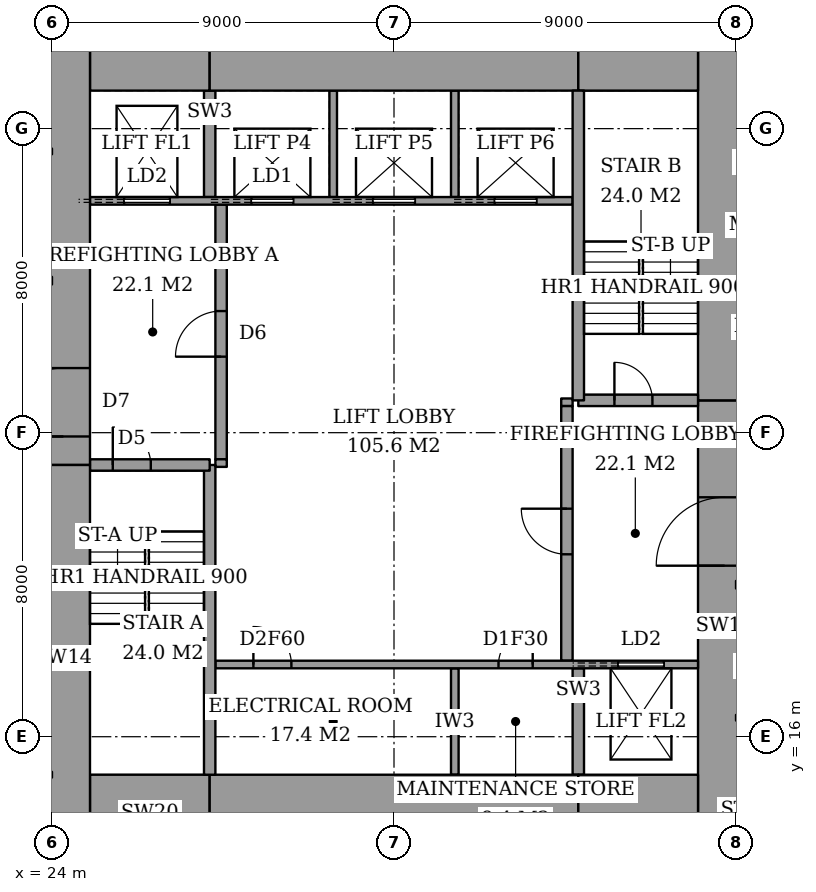
"""IFC4 building model, lengths in metres.
Left out: names, types, materials, properties, quantities, classifications, styles, units other than length and angle.
Written with IfcOpenShell. Run it as: python <this file> out.ifc"""

import sys

from ifc_helpers import new_model, si_unit, direction, frame, frame_2d, origin, place, context, subcontext, project, spatial, rectangle, extrude, element, fill, save


model = new_model("IFC4")
c1 = context("Model", 3, precision=1e-05, world=origin(), true_north=direction((0.0, 1.0)))
c2 = subcontext(c1, "Body", "Model", "MODEL_VIEW")
j1 = project(units=[si_unit("LENGTHUNIT", "METRE"), si_unit("PLANEANGLEUNIT", "RADIAN")], contexts=[c1])
p1 = place(None, origin())
s1 = spatial("IfcSite", under=j1, at=p1, CompositionType="ELEMENT")
p2 = place(p1, origin())
s2 = spatial("IfcBuilding", under=s1, at=p2, CompositionType="ELEMENT")
p3 = place(p2, frame((0.0, 0.0, 196.6)))
s3 = spatial("IfcBuildingStorey", under=s2, at=p3, CompositionType="ELEMENT", Elevation=196.6)
p4 = place(p3, frame((25.0, 14.0, 0.0), z_axis=(0.0, 0.0, 1.0), x_axis=(1.0, 0.0, 0.0)))
e1 = element("IfcWall", 1, at=p4, inside=s3, PredefinedType="SHEAR", context=c2, shape_type="SweptSolid", body=[
    extrude(rectangle(XDim=3.15, YDim=2.0, at=frame_2d((1.575, 0.0))), origin(), (0.0, 0.0, 1.0), 3.6),
])
p5 = place(p3, frame((28.15, 14.0, 0.0), z_axis=(0.0, 0.0, 1.0), x_axis=(1.0, 0.0, 0.0)))
e2 = element("IfcWall", 2, at=p5, inside=s3, PredefinedType="SHEAR", context=c2, shape_type="SweptSolid", body=[
    extrude(rectangle(XDim=9.7, YDim=2.0, at=frame_2d((4.85, 0.0))), origin(), (0.0, 0.0, 1.0), 3.6),
])
for number, where, z_axis, x_axis in (
    (3, (37.85, 14.0, 0.0), (0.0, 0.0, 1.0), (1.0, 0.0, 0.0)),
    (4, (25.0, 34.0, 0.0), (0.0, 0.0, 1.0), (1.0, 0.0, 0.0)),
):
    element("IfcWall", number, at=place(p3, frame(where, z_axis=z_axis, x_axis=x_axis)), inside=s3, PredefinedType="SHEAR", context=c2, shape_type="SweptSolid", body=[
        extrude(rectangle(XDim=3.15, YDim=2.0, at=frame_2d((1.575, 0.0))), origin(), (0.0, 0.0, 1.0), 3.6),
    ])
p6 = place(p3, frame((28.15, 34.0, 0.0), z_axis=(0.0, 0.0, 1.0), x_axis=(1.0, 0.0, 0.0)))
e5 = element("IfcWall", 5, at=p6, inside=s3, PredefinedType="SHEAR", context=c2, shape_type="SweptSolid", body=[
    extrude(rectangle(XDim=9.7, YDim=2.0, at=frame_2d((4.85, 0.0))), origin(), (0.0, 0.0, 1.0), 3.6),
])
p7 = place(p3, frame((37.85, 34.0, 0.0), z_axis=(0.0, 0.0, 1.0), x_axis=(1.0, 0.0, 0.0)))
e6 = element("IfcWall", 6, at=p7, inside=s3, PredefinedType="SHEAR", context=c2, shape_type="SweptSolid", body=[
    extrude(rectangle(XDim=3.15, YDim=2.0, at=frame_2d((1.575, 0.0))), origin(), (0.0, 0.0, 1.0), 3.6),
])
p8 = place(p3, frame((24.3, 13.0, 0.0), z_axis=(0.0, 0.0, 1.0), x_axis=(0.0, 1.0, 0.0)))
e7 = element("IfcWall", 7, at=p8, inside=s3, PredefinedType="SHEAR", context=c2, shape_type="SweptSolid", body=[
    extrude(rectangle(XDim=10.15, YDim=1.4, at=frame_2d((5.075, 0.0))), origin(), (0.0, 0.0, 1.0), 3.6),
])
p9 = place(p3, frame((24.3, 23.15, 0.0), z_axis=(0.0, 0.0, 1.0), x_axis=(0.0, 1.0, 0.0)))
e8 = element("IfcWall", 8, at=p9, inside=s3, PredefinedType="SHEAR", context=c2, shape_type="SweptSolid", body=[
    extrude(rectangle(XDim=11.85, YDim=1.4, at=frame_2d((5.925, 0.0))), origin(), (0.0, 0.0, 1.0), 3.6),
])
p10 = place(p9, frame((0.75, 0.0, 0.0)))
e9 = element("IfcOpeningElement", 9, at=p10, cuts=e8, PredefinedType="OPENING", context=c2, shape_type="SweptSolid", body=[
    extrude(rectangle(XDim=1.8, YDim=2.4, at=frame_2d((0.9, 1.2))), frame((0.0, 0.71, 0.0), z_axis=(0.0, -1.0, 0.0), x_axis=(1.0, 0.0, 0.0)), (0.0, 0.0, 1.0), 1.42),
])
p11 = place(p3, frame((41.7, 13.0, 0.0), z_axis=(0.0, 0.0, 1.0), x_axis=(0.0, 1.0, 0.0)))
e10 = element("IfcWall", 10, at=p11, inside=s3, PredefinedType="SHEAR", context=c2, shape_type="SweptSolid", body=[
    extrude(rectangle(XDim=11.85, YDim=1.4, at=frame_2d((5.925, 0.0))), origin(), (0.0, 0.0, 1.0), 3.6),
])
p12 = place(p11, frame((7.5, 0.0, 0.0)))
e11 = element("IfcOpeningElement", 11, at=p12, cuts=e10, PredefinedType="OPENING", context=c2, shape_type="SweptSolid", body=[
    extrude(rectangle(XDim=1.8, YDim=2.4, at=frame_2d((0.9, 1.2))), frame((0.0, 0.71, 0.0), z_axis=(0.0, -1.0, 0.0), x_axis=(1.0, 0.0, 0.0)), (0.0, 0.0, 1.0), 1.42),
])
p13 = place(p3, frame((41.7, 24.85, 0.0), z_axis=(0.0, 0.0, 1.0), x_axis=(0.0, 1.0, 0.0)))
e12 = element("IfcWall", 12, at=p13, inside=s3, PredefinedType="SHEAR", context=c2, shape_type="SweptSolid", body=[
    extrude(rectangle(XDim=10.15, YDim=1.4, at=frame_2d((5.075, 0.0))), origin(), (0.0, 0.0, 1.0), 3.6),
])
p14 = place(p3, frame((28.15, 15.0, 0.0), z_axis=(0.0, 0.0, 1.0), x_axis=(0.0, 1.0, 0.0)))
e13 = element("IfcWall", 13, at=p14, inside=s3, PredefinedType="SHEAR", context=c2, shape_type="SweptSolid", body=[
    extrude(rectangle(XDim=8.15, YDim=0.3, at=frame_2d((4.075, 0.0))), origin(), (0.0, 0.0, 1.0), 3.6),
])
p15 = place(p3, frame((25.0, 23.15, 0.0), z_axis=(0.0, 0.0, 1.0), x_axis=(1.0, 0.0, 0.0)))
e14 = element("IfcWall", 14, at=p15, inside=s3, PredefinedType="SHEAR", context=c2, shape_type="SweptSolid", body=[
    extrude(rectangle(XDim=3.15, YDim=0.3, at=frame_2d((1.575, 0.0))), origin(), (0.0, 0.0, 1.0), 3.6),
])
p16 = place(p15, frame((0.6, 0.0, 0.0)))
e15 = element("IfcOpeningElement", 15, at=p16, cuts=e14, PredefinedType="OPENING", context=c2, shape_type="SweptSolid", body=[
    extrude(rectangle(XDim=1.0, YDim=2.1, at=frame_2d((0.5, 1.05))), frame((0.0, 0.16, 0.0), z_axis=(0.0, -1.0, 0.0), x_axis=(1.0, 0.0, 0.0)), (0.0, 0.0, 1.0), 0.32),
])
p17 = place(p3, frame((37.85, 24.85, 0.0), z_axis=(0.0, 0.0, 1.0), x_axis=(0.0, 1.0, 0.0)))
e16 = element("IfcWall", 16, at=p17, inside=s3, PredefinedType="SHEAR", context=c2, shape_type="SweptSolid", body=[
    extrude(rectangle(XDim=8.15, YDim=0.3, at=frame_2d((4.075, 0.0))), origin(), (0.0, 0.0, 1.0), 3.6),
])
p18 = place(p3, frame((37.85, 24.85, 0.0), z_axis=(0.0, 0.0, 1.0), x_axis=(1.0, 0.0, 0.0)))
e17 = element("IfcWall", 17, at=p18, inside=s3, PredefinedType="SHEAR", context=c2, shape_type="SweptSolid", body=[
    extrude(rectangle(XDim=3.15, YDim=0.3, at=frame_2d((1.575, 0.0))), origin(), (0.0, 0.0, 1.0), 3.6),
])
p19 = place(p18, frame((0.95, 0.0, 0.0)))
e18 = element("IfcOpeningElement", 18, at=p19, cuts=e17, PredefinedType="OPENING", context=c2, shape_type="SweptSolid", body=[
    extrude(rectangle(XDim=1.0, YDim=2.1, at=frame_2d((0.5, 1.05))), frame((0.0, 0.16, 0.0), z_axis=(0.0, -1.0, 0.0), x_axis=(1.0, 0.0, 0.0)), (0.0, 0.0, 1.0), 0.32),
])
p20 = place(p3, frame((28.45, 23.3, 0.0), z_axis=(0.0, 0.0, 1.0), x_axis=(0.0, 1.0, 0.0)))
e19 = element("IfcWall", 19, at=p20, inside=s3, PredefinedType="PARTITIONING", context=c2, shape_type="SweptSolid", body=[
    extrude(rectangle(XDim=6.7, YDim=0.3, at=frame_2d((3.35, 0.0))), origin(), (0.0, 0.0, 1.0), 3.6),
])
p21 = place(p20, frame((2.7, 0.0, 0.0)))
e20 = element("IfcOpeningElement", 20, at=p21, cuts=e19, PredefinedType="OPENING", context=c2, shape_type="SweptSolid", body=[
    extrude(rectangle(XDim=1.2, YDim=2.1, at=frame_2d((0.6, 1.05))), frame((0.0, 0.16, 0.0), z_axis=(0.0, -1.0, 0.0), x_axis=(1.0, 0.0, 0.0)), (0.0, 0.0, 1.0), 0.32),
])
p22 = place(p3, frame((37.55, 18.0, 0.0), z_axis=(0.0, 0.0, 1.0), x_axis=(0.0, 1.0, 0.0)))
e21 = element("IfcWall", 21, at=p22, inside=s3, PredefinedType="PARTITIONING", context=c2, shape_type="SweptSolid", body=[
    extrude(rectangle(XDim=6.7, YDim=0.3, at=frame_2d((3.35, 0.0))), origin(), (0.0, 0.0, 1.0), 3.6),
])
p23 = place(p22, frame((2.8, 0.0, 0.0)))
e22 = element("IfcOpeningElement", 22, at=p23, cuts=e21, PredefinedType="OPENING", context=c2, shape_type="SweptSolid", body=[
    extrude(rectangle(XDim=1.2, YDim=2.1, at=frame_2d((0.6, 1.05))), frame((0.0, 0.16, 0.0), z_axis=(0.0, -1.0, 0.0), x_axis=(1.0, 0.0, 0.0)), (0.0, 0.0, 1.0), 0.32),
])
p24 = place(p3, frame((28.3, 17.9, 0.0), z_axis=(0.0, 0.0, 1.0), x_axis=(1.0, 0.0, 0.0)))
e23 = element("IfcWall", 23, at=p24, inside=s3, PredefinedType="PARTITIONING", context=c2, shape_type="SweptSolid", body=[
    extrude(rectangle(XDim=12.7, YDim=0.2, at=frame_2d((6.35, 0.0))), origin(), (0.0, 0.0, 1.0), 3.6),
])
p25 = place(p24, frame((1.0, 0.0, 0.0)))
e24 = element("IfcOpeningElement", 24, at=p25, cuts=e23, PredefinedType="OPENING", context=c2, shape_type="SweptSolid", body=[
    extrude(rectangle(XDim=1.0, YDim=2.1, at=frame_2d((0.5, 1.05))), frame((0.0, 0.11, 0.0), z_axis=(0.0, -1.0, 0.0), x_axis=(1.0, 0.0, 0.0)), (0.0, 0.0, 1.0), 0.22),
])
p26 = place(p24, frame((7.45, 0.0, 0.0)))
e25 = element("IfcOpeningElement", 25, at=p26, cuts=e23, PredefinedType="OPENING", context=c2, shape_type="SweptSolid", body=[
    extrude(rectangle(XDim=0.9, YDim=2.1, at=frame_2d((0.45, 1.05))), frame((0.0, 0.11, 0.0), z_axis=(0.0, -1.0, 0.0), x_axis=(1.0, 0.0, 0.0)), (0.0, 0.0, 1.0), 0.22),
])
p27 = place(p24, frame((10.6, 0.0, 0.0)))
e26 = element("IfcOpeningElement", 26, at=p27, cuts=e23, PredefinedType="OPENING", context=c2, shape_type="SweptSolid", body=[
    extrude(rectangle(XDim=1.2, YDim=2.1, at=frame_2d((0.6, 1.05))), frame((0.0, 0.11, 0.0), z_axis=(0.0, -1.0, 0.0), x_axis=(1.0, 0.0, 0.0)), (0.0, 0.0, 1.0), 0.22),
])
p28 = place(p3, frame((25.0, 30.1, 0.0), z_axis=(0.0, 0.0, 1.0), x_axis=(1.0, 0.0, 0.0)))
e27 = element("IfcWall", 27, at=p28, inside=s3, PredefinedType="PARTITIONING", context=c2, shape_type="SweptSolid", body=[
    extrude(rectangle(XDim=12.7, YDim=0.2, at=frame_2d((6.35, 0.0))), origin(), (0.0, 0.0, 1.0), 3.6),
])
p29 = place(p28, frame((4.25, 0.0, 0.0)))
e28 = element("IfcOpeningElement", 28, at=p29, cuts=e27, PredefinedType="OPENING", context=c2, shape_type="SweptSolid", body=[
    extrude(rectangle(XDim=1.1, YDim=2.1, at=frame_2d((0.55, 1.05))), frame((0.0, 0.11, 0.0), z_axis=(0.0, -1.0, 0.0), x_axis=(1.0, 0.0, 0.0)), (0.0, 0.0, 1.0), 0.22),
])
p30 = place(p28, frame((7.45, 0.0, 0.0)))
e29 = element("IfcOpeningElement", 29, at=p30, cuts=e27, PredefinedType="OPENING", context=c2, shape_type="SweptSolid", body=[
    extrude(rectangle(XDim=1.1, YDim=2.1, at=frame_2d((0.55, 1.05))), frame((0.0, 0.11, 0.0), z_axis=(0.0, -1.0, 0.0), x_axis=(1.0, 0.0, 0.0)), (0.0, 0.0, 1.0), 0.22),
])
p31 = place(p28, frame((10.65, 0.0, 0.0)))
e30 = element("IfcOpeningElement", 30, at=p31, cuts=e27, PredefinedType="OPENING", context=c2, shape_type="SweptSolid", body=[
    extrude(rectangle(XDim=1.1, YDim=2.1, at=frame_2d((0.55, 1.05))), frame((0.0, 0.11, 0.0), z_axis=(0.0, -1.0, 0.0), x_axis=(1.0, 0.0, 0.0)), (0.0, 0.0, 1.0), 0.22),
])
p32 = place(p28, frame((0.9, 0.0, 0.0)))
e31 = element("IfcOpeningElement", 31, at=p32, cuts=e27, PredefinedType="OPENING", context=c2, shape_type="SweptSolid", body=[
    extrude(rectangle(XDim=1.2, YDim=2.1, at=frame_2d((0.6, 1.05))), frame((0.0, 0.11, 0.0), z_axis=(0.0, -1.0, 0.0), x_axis=(1.0, 0.0, 0.0)), (0.0, 0.0, 1.0), 0.22),
])
p33 = place(p3, frame((34.6, 15.0, 0.0), z_axis=(0.0, 0.0, 1.0), x_axis=(0.0, 1.0, 0.0)))
e32 = element("IfcWall", 32, at=p33, inside=s3, PredefinedType="PARTITIONING", context=c2, shape_type="SweptSolid", body=[
    extrude(rectangle(XDim=2.8, YDim=0.2, at=frame_2d((1.4, 0.0))), origin(), (0.0, 0.0, 1.0), 3.6),
])
p34 = place(p3, frame((37.85, 15.0, 0.0), z_axis=(0.0, 0.0, 1.0), x_axis=(0.0, 1.0, 0.0)))
e33 = element("IfcWall", 33, at=p34, inside=s3, PredefinedType="SHEAR", context=c2, shape_type="SweptSolid", body=[
    extrude(rectangle(XDim=2.8, YDim=0.3, at=frame_2d((1.4, 0.0))), origin(), (0.0, 0.0, 1.0), 3.6),
])
for number, where, z_axis, x_axis in (
    (34, (31.4, 30.2, 0.0), (0.0, 0.0, 1.0), (0.0, 1.0, 0.0)),
    (35, (34.6, 30.2, 0.0), (0.0, 0.0, 1.0), (0.0, 1.0, 0.0)),
):
    element("IfcWall", number, at=place(p3, frame(where, z_axis=z_axis, x_axis=x_axis)), inside=s3, PredefinedType="PARTITIONING", context=c2, shape_type="SweptSolid", body=[
        extrude(rectangle(XDim=2.8, YDim=0.2, at=frame_2d((1.4, 0.0))), origin(), (0.0, 0.0, 1.0), 3.6),
    ])
p35 = place(p3, frame((28.15, 30.2, 0.0), z_axis=(0.0, 0.0, 1.0), x_axis=(0.0, 1.0, 0.0)))
e36 = element("IfcWall", 36, at=p35, inside=s3, PredefinedType="SHEAR", context=c2, shape_type="SweptSolid", body=[
    extrude(rectangle(XDim=2.8, YDim=0.3, at=frame_2d((1.4, 0.0))), origin(), (0.0, 0.0, 1.0), 3.6),
])
for number, where, z_axis, x_axis in (
    (37, (28.3, 23.2, 0.0), (0.0, 0.0, 1.0), (1.0, 0.0, 0.0)),
    (38, (37.4, 24.8, 0.0), (0.0, 0.0, 1.0), (1.0, 0.0, 0.0)),
):
    element("IfcWall", number, at=place(p3, frame(where, z_axis=z_axis, x_axis=x_axis)), inside=s3, PredefinedType="PARTITIONING", context=c2, shape_type="SweptSolid", body=[
        extrude(rectangle(XDim=0.3, YDim=0.2, at=frame_2d((0.15, 0.0))), origin(), (0.0, 0.0, 1.0), 3.6),
    ])
p36 = place(p16, origin())
e39 = element("IfcDoor", 39, at=p36, inside=s3, OperationType="SINGLE_SWING_RIGHT", PredefinedType="DOOR", context=c2, shape_type="SweptSolid", body=[
    extrude(rectangle(XDim=1.0, YDim=2.1, at=frame_2d((0.5, 1.05))), frame((0.0, 0.025, 0.0), z_axis=(0.0, -1.0, 0.0), x_axis=(1.0, 0.0, 0.0)), (0.0, 0.0, 1.0), 0.05),
])
fill(e15, e39)
p37 = place(p19, origin())
e40 = element("IfcDoor", 40, at=p37, inside=s3, OperationType="SINGLE_SWING_RIGHT", PredefinedType="DOOR", context=c2, shape_type="SweptSolid", body=[
    extrude(rectangle(XDim=1.0, YDim=2.1, at=frame_2d((0.5, 1.05))), frame((0.0, 0.025, 0.0), z_axis=(0.0, -1.0, 0.0), x_axis=(1.0, 0.0, 0.0)), (0.0, 0.0, 1.0), 0.05),
])
fill(e18, e40)
p38 = place(p21, origin())
e41 = element("IfcDoor", 41, at=p38, inside=s3, OperationType="SINGLE_SWING_RIGHT", PredefinedType="DOOR", context=c2, shape_type="SweptSolid", body=[
    extrude(rectangle(XDim=1.2, YDim=2.1, at=frame_2d((0.6, 1.05))), frame((0.0, 0.025, 0.0), z_axis=(0.0, -1.0, 0.0), x_axis=(1.0, 0.0, 0.0)), (0.0, 0.0, 1.0), 0.05),
])
fill(e20, e41)
p39 = place(p23, origin())
e42 = element("IfcDoor", 42, at=p39, inside=s3, OperationType="SINGLE_SWING_LEFT", PredefinedType="DOOR", context=c2, shape_type="SweptSolid", body=[
    extrude(rectangle(XDim=1.2, YDim=2.1, at=frame_2d((0.6, 1.05))), frame((0.0, 0.025, 0.0), z_axis=(0.0, -1.0, 0.0), x_axis=(1.0, 0.0, 0.0)), (0.0, 0.0, 1.0), 0.05),
])
fill(e22, e42)
p40 = place(p10, origin())
e43 = element("IfcDoor", 43, at=p40, inside=s3, OperationType="DOUBLE_DOOR_DOUBLE_SWING", PredefinedType="DOOR", context=c2, shape_type="SweptSolid", body=[
    extrude(rectangle(XDim=1.8, YDim=2.4, at=frame_2d((0.9, 1.2))), frame((0.0, 0.025, 0.0), z_axis=(0.0, -1.0, 0.0), x_axis=(1.0, 0.0, 0.0)), (0.0, 0.0, 1.0), 0.05),
])
fill(e9, e43)
p41 = place(p12, origin())
e44 = element("IfcDoor", 44, at=p41, inside=s3, OperationType="DOUBLE_DOOR_DOUBLE_SWING", PredefinedType="DOOR", context=c2, shape_type="SweptSolid", body=[
    extrude(rectangle(XDim=1.8, YDim=2.4, at=frame_2d((0.9, 1.2))), frame((0.0, 0.025, 0.0), z_axis=(0.0, -1.0, 0.0), x_axis=(1.0, 0.0, 0.0)), (0.0, 0.0, 1.0), 0.05),
])
fill(e11, e44)
p42 = place(p25, origin())
e45 = element("IfcDoor", 45, at=p42, inside=s3, OperationType="SINGLE_SWING_RIGHT", PredefinedType="DOOR", context=c2, shape_type="SweptSolid", body=[
    extrude(rectangle(XDim=1.0, YDim=2.1, at=frame_2d((0.5, 1.05))), frame((0.0, 0.025, 0.0), z_axis=(0.0, -1.0, 0.0), x_axis=(1.0, 0.0, 0.0)), (0.0, 0.0, 1.0), 0.05),
])
fill(e24, e45)
p43 = place(p26, origin())
e46 = element("IfcDoor", 46, at=p43, inside=s3, OperationType="SINGLE_SWING_LEFT", PredefinedType="DOOR", context=c2, shape_type="SweptSolid", body=[
    extrude(rectangle(XDim=0.9, YDim=2.1, at=frame_2d((0.45, 1.05))), frame((0.0, 0.025, 0.0), z_axis=(0.0, -1.0, 0.0), x_axis=(1.0, 0.0, 0.0)), (0.0, 0.0, 1.0), 0.05),
])
fill(e25, e46)
p44 = place(p29, origin())
e47 = element("IfcDoor", 47, at=p44, inside=s3, OperationType="SLIDING_TO_LEFT", PredefinedType="DOOR", context=c2, shape_type="SweptSolid", body=[
    extrude(rectangle(XDim=1.1, YDim=2.1, at=frame_2d((0.55, 1.05))), frame((0.0, 0.025, 0.0), z_axis=(0.0, -1.0, 0.0), x_axis=(1.0, 0.0, 0.0)), (0.0, 0.0, 1.0), 0.05),
])
fill(e28, e47)
p45 = place(p30, origin())
e48 = element("IfcDoor", 48, at=p45, inside=s3, OperationType="SLIDING_TO_LEFT", PredefinedType="DOOR", context=c2, shape_type="SweptSolid", body=[
    extrude(rectangle(XDim=1.1, YDim=2.1, at=frame_2d((0.55, 1.05))), frame((0.0, 0.025, 0.0), z_axis=(0.0, -1.0, 0.0), x_axis=(1.0, 0.0, 0.0)), (0.0, 0.0, 1.0), 0.05),
])
fill(e29, e48)
p46 = place(p31, origin())
e49 = element("IfcDoor", 49, at=p46, inside=s3, OperationType="SLIDING_TO_LEFT", PredefinedType="DOOR", context=c2, shape_type="SweptSolid", body=[
    extrude(rectangle(XDim=1.1, YDim=2.1, at=frame_2d((0.55, 1.05))), frame((0.0, 0.025, 0.0), z_axis=(0.0, -1.0, 0.0), x_axis=(1.0, 0.0, 0.0)), (0.0, 0.0, 1.0), 0.05),
])
fill(e30, e49)
p47 = place(p32, origin())
e50 = element("IfcDoor", 50, at=p47, inside=s3, OperationType="SLIDING_TO_LEFT", PredefinedType="DOOR", context=c2, shape_type="SweptSolid", body=[
    extrude(rectangle(XDim=1.2, YDim=2.1, at=frame_2d((0.6, 1.05))), frame((0.0, 0.025, 0.0), z_axis=(0.0, -1.0, 0.0), x_axis=(1.0, 0.0, 0.0)), (0.0, 0.0, 1.0), 0.05),
])
fill(e31, e50)
p48 = place(p27, origin())
e51 = element("IfcDoor", 51, at=p48, inside=s3, OperationType="SLIDING_TO_LEFT", PredefinedType="DOOR", context=c2, shape_type="SweptSolid", body=[
    extrude(rectangle(XDim=1.2, YDim=2.1, at=frame_2d((0.6, 1.05))), frame((0.0, 0.025, 0.0), z_axis=(0.0, -1.0, 0.0), x_axis=(1.0, 0.0, 0.0)), (0.0, 0.0, 1.0), 0.05),
])
fill(e26, e51)
save(model, sys.argv[1])
